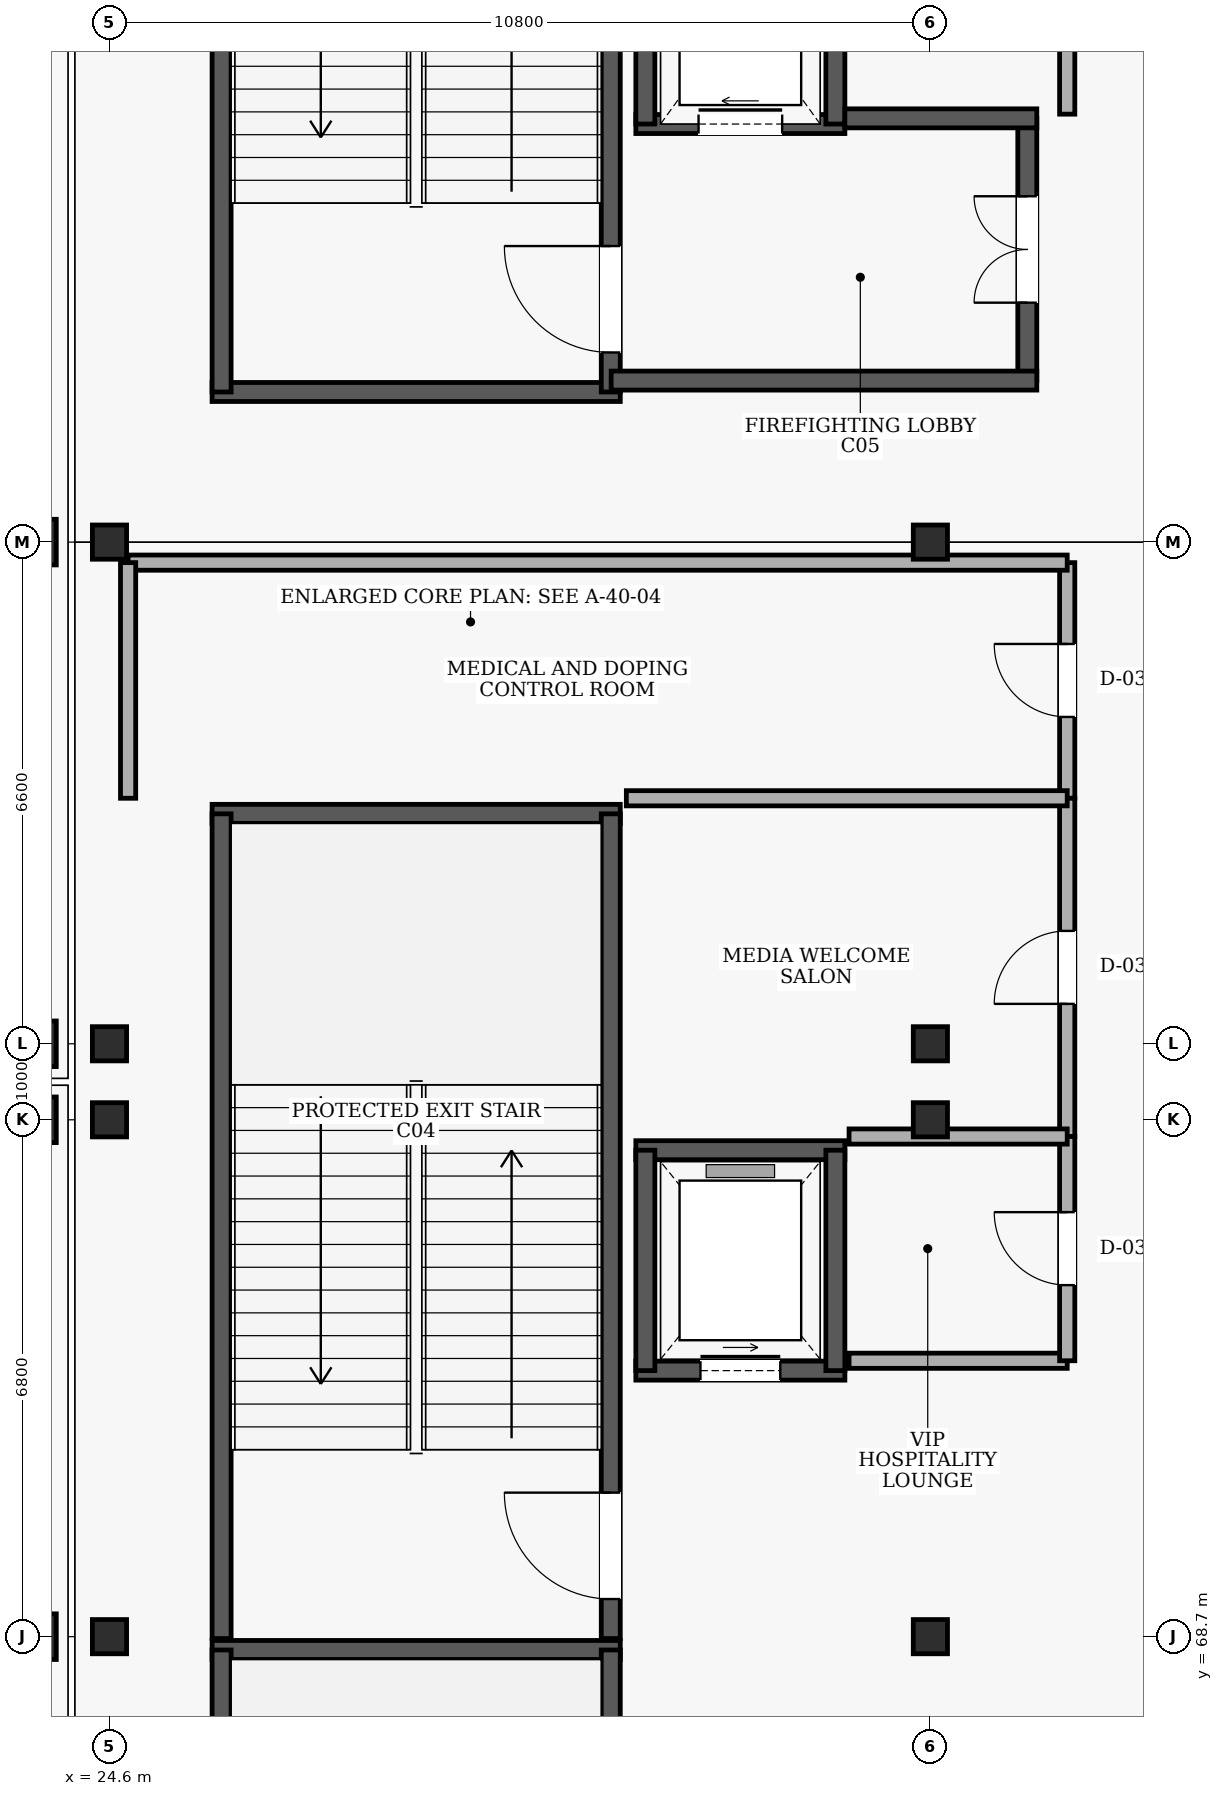
"""IFC4 building model, lengths in metres.
Left out: names, types, materials, properties, quantities, classifications, styles, units other than length and angle.
Written with IfcOpenShell. Run it as: python <this file> out.ifc"""

import sys

from ifc_helpers import new_model, si_unit, direction, frame, frame_2d, origin, origin_2d, place, context, subcontext, project, spatial, rectangle, extrude, element, fill, save


model = new_model("IFC4")
c1 = context("Model", 3, precision=1e-05, world=origin(), true_north=direction((0.0, 1.0)))
c2 = subcontext(c1, "Body", "Model", "MODEL_VIEW")
j1 = project(units=[si_unit("LENGTHUNIT", "METRE"), si_unit("PLANEANGLEUNIT", "RADIAN")], contexts=[c1])
p1 = place(None, origin())
s1 = spatial("IfcSite", under=j1, at=p1, CompositionType="ELEMENT")
p2 = place(p1, origin())
s2 = spatial("IfcBuilding", under=s1, at=p2, CompositionType="ELEMENT")
p3 = place(p2, origin())
s3 = spatial("IfcBuildingStorey", under=s2, at=p3, CompositionType="ELEMENT", Elevation=0.0)
for number, where, z_axis, x_axis in (
    (1, (23.6, 68.7, 0.0), (0.0, 0.0, 1.0), (1.0, 0.0, 0.0)),
    (2, (23.6, 75.5, 0.0), (0.0, 0.0, 1.0), (1.0, 0.0, 0.0)),
    (3, (23.6, 76.5, 0.0), (0.0, 0.0, 1.0), (1.0, 0.0, 0.0)),
    (4, (23.6, 83.1, 0.0), (0.0, 0.0, 1.0), (1.0, 0.0, 0.0)),
):
    element("IfcColumn", number, at=place(p3, frame(where, z_axis=z_axis, x_axis=x_axis)), inside=s3, PredefinedType="COLUMN", context=c2, shape_type="SweptSolid", body=[
        extrude(rectangle(XDim=0.6, YDim=0.6, at=origin_2d()), origin(), (0.0, 0.0, 1.0), 5.4),
    ])
for number, where, z_axis, x_axis in (
    (5, (24.6, 68.7, 0.0), (0.0, 0.0, 1.0), (1.0, 0.0, 0.0)),
    (6, (24.6, 75.5, 0.0), (0.0, 0.0, 1.0), (1.0, 0.0, 0.0)),
    (7, (24.6, 76.5, 0.0), (0.0, 0.0, 1.0), (1.0, 0.0, 0.0)),
    (8, (24.6, 83.1, 0.0), (0.0, 0.0, 1.0), (1.0, 0.0, 0.0)),
    (9, (35.4, 68.7, 0.0), (0.0, 0.0, 1.0), (1.0, 0.0, 0.0)),
    (10, (35.4, 75.5, 0.0), (0.0, 0.0, 1.0), (1.0, 0.0, 0.0)),
    (11, (35.4, 76.5, 0.0), (0.0, 0.0, 1.0), (1.0, 0.0, 0.0)),
    (12, (35.4, 83.1, 0.0), (0.0, 0.0, 1.0), (1.0, 0.0, 0.0)),
):
    element("IfcColumn", number, at=place(p3, frame(where, z_axis=z_axis, x_axis=x_axis)), inside=s3, PredefinedType="COLUMN", context=c2, shape_type="SweptSolid", body=[
        extrude(rectangle(XDim=0.45, YDim=0.45, at=origin_2d()), origin(), (0.0, 0.0, 1.0), 5.4),
    ])
p4 = place(p3, frame((31.32, 68.525, 0.0), z_axis=(0.0, 0.0, 1.0), x_axis=(-1.0, 0.0, 0.0)))
e13 = element("IfcWall", 13, at=p4, inside=s3, PredefinedType="SHEAR", context=c2, shape_type="SweptSolid", body=[
    extrude(rectangle(XDim=5.37, YDim=0.25, at=frame_2d((2.685, 0.0))), origin(), (0.0, 0.0, 1.0), 5.08),
])
p5 = place(p3, frame((26.075, 57.675, 0.0), z_axis=(0.0, 0.0, 1.0), x_axis=(0.0, 1.0, 0.0)))
e14 = element("IfcWall", 14, at=p5, inside=s3, PredefinedType="SHEAR", context=c2, shape_type="SweptSolid", body=[
    extrude(rectangle(XDim=10.85, YDim=0.25, at=frame_2d((5.425, 0.0))), origin(), (0.0, 0.0, 1.0), 5.08),
])
p6 = place(p3, frame((31.195, 57.675, 0.0), z_axis=(0.0, 0.0, 1.0), x_axis=(0.0, 1.0, 0.0)))
e15 = element("IfcWall", 15, at=p6, inside=s3, PredefinedType="SHEAR", context=c2, shape_type="SweptSolid", body=[
    extrude(rectangle(XDim=10.85, YDim=0.25, at=frame_2d((5.425, 0.0))), origin(), (0.0, 0.0, 1.0), 5.08),
])
p7 = place(p6, frame((0.52, 0.0, 0.0)))
e16 = element("IfcOpeningElement", 16, at=p7, cuts=e15, PredefinedType="OPENING", context=c2, shape_type="SweptSolid", body=[
    extrude(rectangle(XDim=1.4, YDim=2.15, at=frame_2d((0.7, 1.075))), frame((0.0, 0.135, 0.0), z_axis=(0.0, -1.0, 0.0), x_axis=(1.0, 0.0, 0.0)), (0.0, 0.0, 1.0), 0.27),
])
p8 = place(p3, frame((31.32, 79.525, 0.0), z_axis=(0.0, 0.0, 1.0), x_axis=(-1.0, 0.0, 0.0)))
e17 = element("IfcWall", 17, at=p8, inside=s3, PredefinedType="SHEAR", context=c2, shape_type="SweptSolid", body=[
    extrude(rectangle(XDim=5.37, YDim=0.25, at=frame_2d((2.685, 0.0))), origin(), (0.0, 0.0, 1.0), 5.08),
])
p9 = place(p3, frame((26.075, 68.675, 0.0), z_axis=(0.0, 0.0, 1.0), x_axis=(0.0, 1.0, 0.0)))
e18 = element("IfcWall", 18, at=p9, inside=s3, PredefinedType="SHEAR", context=c2, shape_type="SweptSolid", body=[
    extrude(rectangle(XDim=10.85, YDim=0.25, at=frame_2d((5.425, 0.0))), origin(), (0.0, 0.0, 1.0), 5.08),
])
p10 = place(p3, frame((31.195, 68.675, 0.0), z_axis=(0.0, 0.0, 1.0), x_axis=(0.0, 1.0, 0.0)))
e19 = element("IfcWall", 19, at=p10, inside=s3, PredefinedType="SHEAR", context=c2, shape_type="SweptSolid", body=[
    extrude(rectangle(XDim=10.85, YDim=0.25, at=frame_2d((5.425, 0.0))), origin(), (0.0, 0.0, 1.0), 5.08),
])
p11 = place(p10, frame((0.52, 0.0, 0.0)))
e20 = element("IfcOpeningElement", 20, at=p11, cuts=e19, PredefinedType="OPENING", context=c2, shape_type="SweptSolid", body=[
    extrude(rectangle(XDim=1.4, YDim=2.15, at=frame_2d((0.7, 1.075))), frame((0.0, 0.135, 0.0), z_axis=(0.0, -1.0, 0.0), x_axis=(1.0, 0.0, 0.0)), (0.0, 0.0, 1.0), 0.27),
])
p12 = place(p3, frame((25.95, 85.075, 0.0), z_axis=(0.0, 0.0, 1.0), x_axis=(1.0, 0.0, 0.0)))
e21 = element("IfcWall", 21, at=p12, inside=s3, PredefinedType="SHEAR", context=c2, shape_type="SweptSolid", body=[
    extrude(rectangle(XDim=5.37, YDim=0.25, at=frame_2d((2.685, 0.0))), origin(), (0.0, 0.0, 1.0), 5.08),
])
p13 = place(p3, frame((26.075, 85.075, 0.0), z_axis=(0.0, 0.0, 1.0), x_axis=(0.0, 1.0, 0.0)))
e22 = element("IfcWall", 22, at=p13, inside=s3, PredefinedType="SHEAR", context=c2, shape_type="SweptSolid", body=[
    extrude(rectangle(XDim=10.85, YDim=0.25, at=frame_2d((5.425, 0.0))), origin(), (0.0, 0.0, 1.0), 5.08),
])
p14 = place(p3, frame((31.195, 85.075, 0.0), z_axis=(0.0, 0.0, 1.0), x_axis=(0.0, 1.0, 0.0)))
e23 = element("IfcWall", 23, at=p14, inside=s3, PredefinedType="SHEAR", context=c2, shape_type="SweptSolid", body=[
    extrude(rectangle(XDim=10.85, YDim=0.25, at=frame_2d((5.425, 0.0))), origin(), (0.0, 0.0, 1.0), 5.08),
])
p15 = place(p14, frame((0.52, 0.0, 0.0)))
e24 = element("IfcOpeningElement", 24, at=p15, cuts=e23, PredefinedType="OPENING", context=c2, shape_type="SweptSolid", body=[
    extrude(rectangle(XDim=1.4, YDim=2.15, at=frame_2d((0.7, 1.075))), frame((0.0, 0.135, 0.0), z_axis=(0.0, -1.0, 0.0), x_axis=(1.0, 0.0, 0.0)), (0.0, 0.0, 1.0), 0.27),
])
p16 = place(p3, frame((31.525, 72.2, 0.0), z_axis=(0.0, 0.0, 1.0), x_axis=(1.0, 0.0, 0.0)))
e25 = element("IfcWall", 25, at=p16, inside=s3, PredefinedType="SHEAR", context=c2, shape_type="SweptSolid", body=[
    extrude(rectangle(XDim=2.75, YDim=0.25, at=frame_2d((1.375, 0.0))), origin(), (0.0, 0.0, 1.0), 5.08),
])
p17 = place(p16, frame((0.85, 0.0, 0.0)))
e26 = element("IfcOpeningElement", 26, at=p17, cuts=e25, PredefinedType="OPENING", context=c2, shape_type="SweptSolid", body=[
    extrude(rectangle(XDim=1.05, YDim=2.15, at=frame_2d((0.525, 1.075))), frame((0.0, 0.135, 0.0), z_axis=(0.0, -1.0, 0.0), x_axis=(1.0, 0.0, 0.0)), (0.0, 0.0, 1.0), 0.27),
])
p18 = place(p3, frame((34.275, 75.1, 0.0), z_axis=(0.0, 0.0, 1.0), x_axis=(-1.0, 0.0, 0.0)))
e27 = element("IfcWall", 27, at=p18, inside=s3, PredefinedType="SHEAR", context=c2, shape_type="SweptSolid", body=[
    extrude(rectangle(XDim=2.75, YDim=0.25, at=frame_2d((1.375, 0.0))), origin(), (0.0, 0.0, 1.0), 5.08),
])
for number, where, z_axis, x_axis in (
    (28, (31.65, 75.1, 0.0), (0.0, 0.0, 1.0), (0.0, -1.0, 0.0)),
    (29, (34.15, 72.2, 0.0), (0.0, 0.0, 1.0), (0.0, 1.0, 0.0)),
):
    element("IfcWall", number, at=place(p3, frame(where, z_axis=z_axis, x_axis=x_axis)), inside=s3, PredefinedType="SHEAR", context=c2, shape_type="SweptSolid", body=[
        extrude(rectangle(XDim=2.9, YDim=0.25, at=frame_2d((1.45, 0.0))), origin(), (0.0, 0.0, 1.0), 5.08),
    ])
p19 = place(p3, frame((31.525, 88.6, 0.0), z_axis=(0.0, 0.0, 1.0), x_axis=(1.0, 0.0, 0.0)))
e30 = element("IfcWall", 30, at=p19, inside=s3, PredefinedType="SHEAR", context=c2, shape_type="SweptSolid", body=[
    extrude(rectangle(XDim=2.75, YDim=0.25, at=frame_2d((1.375, 0.0))), origin(), (0.0, 0.0, 1.0), 5.08),
])
p20 = place(p19, frame((0.825, 0.0, 0.0)))
e31 = element("IfcOpeningElement", 31, at=p20, cuts=e30, PredefinedType="OPENING", context=c2, shape_type="SweptSolid", body=[
    extrude(rectangle(XDim=1.1, YDim=2.15, at=frame_2d((0.55, 1.075))), frame((0.0, 0.135, 0.0), z_axis=(0.0, -1.0, 0.0), x_axis=(1.0, 0.0, 0.0)), (0.0, 0.0, 1.0), 0.27),
])
for number, where, z_axis, x_axis in (
    (32, (31.65, 91.5, 0.0), (0.0, 0.0, 1.0), (0.0, -1.0, 0.0)),
    (33, (34.15, 88.6, 0.0), (0.0, 0.0, 1.0), (0.0, 1.0, 0.0)),
):
    element("IfcWall", number, at=place(p3, frame(where, z_axis=z_axis, x_axis=x_axis)), inside=s3, PredefinedType="SHEAR", context=c2, shape_type="SweptSolid", body=[
        extrude(rectangle(XDim=2.9, YDim=0.25, at=frame_2d((1.45, 0.0))), origin(), (0.0, 0.0, 1.0), 5.08),
    ])
p21 = place(p3, frame((36.675, 85.225, 0.0), z_axis=(0.0, 0.0, 1.0), x_axis=(0.0, 1.0, 0.0)))
e34 = element("IfcWall", 34, at=p21, inside=s3, PredefinedType="SHEAR", context=c2, shape_type="SweptSolid", body=[
    extrude(rectangle(XDim=3.45, YDim=0.25, at=frame_2d((1.725, 0.0))), origin(), (0.0, 0.0, 1.0), 5.08),
])
p22 = place(p21, frame((1.025, 0.0, 0.0)))
e35 = element("IfcOpeningElement", 35, at=p22, cuts=e34, PredefinedType="OPENING", context=c2, shape_type="SweptSolid", body=[
    extrude(rectangle(XDim=1.4, YDim=2.15, at=frame_2d((0.7, 1.075))), frame((0.0, 0.135, 0.0), z_axis=(0.0, -1.0, 0.0), x_axis=(1.0, 0.0, 0.0)), (0.0, 0.0, 1.0), 0.27),
])
p23 = place(p3, frame((34.275, 88.675, 0.0), z_axis=(0.0, 0.0, 1.0), x_axis=(1.0, 0.0, 0.0)))
e36 = element("IfcWall", 36, at=p23, inside=s3, PredefinedType="SHEAR", context=c2, shape_type="SweptSolid", body=[
    extrude(rectangle(XDim=2.525, YDim=0.25, at=frame_2d((1.263, 0.0))), origin(), (0.0, 0.0, 1.0), 5.08),
])
p24 = place(p3, frame((31.2, 85.225, 0.0), z_axis=(0.0, 0.0, 1.0), x_axis=(1.0, 0.0, 0.0)))
e37 = element("IfcWall", 37, at=p24, inside=s3, PredefinedType="SHEAR", context=c2, shape_type="SweptSolid", body=[
    extrude(rectangle(XDim=5.6, YDim=0.25, at=frame_2d((2.8, 0.0))), origin(), (0.0, 0.0, 1.0), 5.08),
])
p25 = place(p3, frame((37.2, 79.73, 0.0), z_axis=(0.0, 0.0, 1.0), x_axis=(0.0, 1.0, 0.0)))
e38 = element("IfcWall", 38, at=p25, inside=s3, PredefinedType="PARTITIONING", context=c2, shape_type="SweptSolid", body=[
    extrude(rectangle(XDim=3.1, YDim=0.2, at=frame_2d((1.55, 0.0))), origin(), (0.0, 0.0, 1.0), 5.08),
])
p26 = place(p25, frame((1.07, 0.0, 0.0)))
e39 = element("IfcOpeningElement", 39, at=p26, cuts=e38, PredefinedType="OPENING", context=c2, shape_type="SweptSolid", body=[
    extrude(rectangle(XDim=0.96, YDim=2.1, at=frame_2d((0.48, 1.05))), frame((0.0, 0.11, 0.0), z_axis=(0.0, -1.0, 0.0), x_axis=(1.0, 0.0, 0.0)), (0.0, 0.0, 1.0), 0.22),
])
p27 = place(p3, frame((37.2, 82.83, 0.0), z_axis=(0.0, 0.0, 1.0), x_axis=(-1.0, 0.0, 0.0)))
e40 = element("IfcWall", 40, at=p27, inside=s3, PredefinedType="PARTITIONING", context=c2, shape_type="SweptSolid", body=[
    extrude(rectangle(XDim=12.355, YDim=0.2, at=frame_2d((6.177, 0.0))), origin(), (0.0, 0.0, 1.0), 4.26),
])
p28 = place(p3, frame((24.845, 82.83, 0.0), z_axis=(0.0, 0.0, 1.0), x_axis=(0.0, -1.0, 0.0)))
e41 = element("IfcWall", 41, at=p28, inside=s3, PredefinedType="PARTITIONING", context=c2, shape_type="SweptSolid", body=[
    extrude(rectangle(XDim=3.1, YDim=0.2, at=frame_2d((1.55, 0.0))), origin(), (0.0, 0.0, 1.0), 4.56),
])
p29 = place(p3, frame((37.2, 75.28, 0.0), z_axis=(0.0, 0.0, 1.0), x_axis=(0.0, 1.0, 0.0)))
e42 = element("IfcWall", 42, at=p29, inside=s3, PredefinedType="PARTITIONING", context=c2, shape_type="SweptSolid", body=[
    extrude(rectangle(XDim=4.45, YDim=0.2, at=frame_2d((2.225, 0.0))), origin(), (0.0, 0.0, 1.0), 5.08),
])
p30 = place(p29, frame((1.745, 0.0, 0.0)))
e43 = element("IfcOpeningElement", 43, at=p30, cuts=e42, PredefinedType="OPENING", context=c2, shape_type="SweptSolid", body=[
    extrude(rectangle(XDim=0.96, YDim=2.1, at=frame_2d((0.48, 1.05))), frame((0.0, 0.11, 0.0), z_axis=(0.0, -1.0, 0.0), x_axis=(1.0, 0.0, 0.0)), (0.0, 0.0, 1.0), 0.22),
])
p31 = place(p3, frame((37.2, 79.73, 0.0), z_axis=(0.0, 0.0, 1.0), x_axis=(-1.0, 0.0, 0.0)))
e44 = element("IfcWall", 44, at=p31, inside=s3, PredefinedType="PARTITIONING", context=c2, shape_type="SweptSolid", body=[
    extrude(rectangle(XDim=5.8, YDim=0.2, at=frame_2d((2.9, 0.0))), origin(), (0.0, 0.0, 1.0), 5.08),
])
p32 = place(p3, frame((34.33, 72.33, 0.0), z_axis=(0.0, 0.0, 1.0), x_axis=(1.0, 0.0, 0.0)))
e45 = element("IfcWall", 45, at=p32, inside=s3, PredefinedType="PARTITIONING", context=c2, shape_type="SweptSolid", body=[
    extrude(rectangle(XDim=2.87, YDim=0.2, at=frame_2d((1.435, 0.0))), origin(), (0.0, 0.0, 1.0), 5.08),
])
p33 = place(p3, frame((37.2, 72.33, 0.0), z_axis=(0.0, 0.0, 1.0), x_axis=(0.0, 1.0, 0.0)))
e46 = element("IfcWall", 46, at=p33, inside=s3, PredefinedType="PARTITIONING", context=c2, shape_type="SweptSolid", body=[
    extrude(rectangle(XDim=2.95, YDim=0.2, at=frame_2d((1.475, 0.0))), origin(), (0.0, 0.0, 1.0), 5.08),
])
p34 = place(p33, frame((0.995, 0.0, 0.0)))
e47 = element("IfcOpeningElement", 47, at=p34, cuts=e46, PredefinedType="OPENING", context=c2, shape_type="SweptSolid", body=[
    extrude(rectangle(XDim=0.96, YDim=2.1, at=frame_2d((0.48, 1.05))), frame((0.0, 0.11, 0.0), z_axis=(0.0, -1.0, 0.0), x_axis=(1.0, 0.0, 0.0)), (0.0, 0.0, 1.0), 0.22),
])
p35 = place(p3, frame((37.2, 75.28, 0.0), z_axis=(0.0, 0.0, 1.0), x_axis=(-1.0, 0.0, 0.0)))
e48 = element("IfcWall", 48, at=p35, inside=s3, PredefinedType="PARTITIONING", context=c2, shape_type="SweptSolid", body=[
    extrude(rectangle(XDim=2.87, YDim=0.2, at=frame_2d((1.435, 0.0))), origin(), (0.0, 0.0, 1.0), 5.08),
])
p36 = place(p3, frame((37.2, 88.73, 0.0), z_axis=(0.0, 0.0, 1.0), x_axis=(0.0, 1.0, 0.0)))
e49 = element("IfcWall", 49, at=p36, inside=s3, PredefinedType="PARTITIONING", context=c2, shape_type="SweptSolid", body=[
    extrude(rectangle(XDim=2.95, YDim=0.2, at=frame_2d((1.475, 0.0))), origin(), (0.0, 0.0, 1.0), 5.08),
])
p37 = place(p36, frame((0.975, 0.0, 0.0)))
e50 = element("IfcOpeningElement", 50, at=p37, cuts=e49, PredefinedType="OPENING", context=c2, shape_type="SweptSolid", body=[
    extrude(rectangle(XDim=1.0, YDim=2.1, at=frame_2d((0.5, 1.05))), frame((0.0, 0.11, 0.0), z_axis=(0.0, -1.0, 0.0), x_axis=(1.0, 0.0, 0.0)), (0.0, 0.0, 1.0), 0.22),
])
p38 = place(p11, frame((1.4, 0.0, 0.0), z_axis=(0.0, 0.0, 1.0), x_axis=(-1.0, 0.0, 0.0)))
e51 = element("IfcDoor", 51, at=p38, inside=s3, OperationType="SINGLE_SWING_LEFT", PredefinedType="DOOR", context=c2, shape_type="SweptSolid", body=[
    extrude(rectangle(XDim=1.4, YDim=2.15, at=frame_2d((0.7, 1.075))), frame((0.0, 0.025, 0.0), z_axis=(0.0, -1.0, 0.0), x_axis=(1.0, 0.0, 0.0)), (0.0, 0.0, 1.0), 0.05),
])
fill(e20, e51)
p39 = place(p15, frame((1.4, 0.0, 0.0), z_axis=(0.0, 0.0, 1.0), x_axis=(-1.0, 0.0, 0.0)))
e52 = element("IfcDoor", 52, at=p39, inside=s3, OperationType="SINGLE_SWING_LEFT", PredefinedType="DOOR", context=c2, shape_type="SweptSolid", body=[
    extrude(rectangle(XDim=1.4, YDim=2.15, at=frame_2d((0.7, 1.075))), frame((0.0, 0.025, 0.0), z_axis=(0.0, -1.0, 0.0), x_axis=(1.0, 0.0, 0.0)), (0.0, 0.0, 1.0), 0.05),
])
fill(e24, e52)
p40 = place(p17, origin())
e53 = element("IfcDoor", 53, at=p40, inside=s3, OperationType="SLIDING_TO_LEFT", PredefinedType="DOOR", context=c2, shape_type="SweptSolid", body=[
    extrude(rectangle(XDim=1.05, YDim=2.15, at=frame_2d((0.525, 1.075))), frame((0.0, 0.025, 0.0), z_axis=(0.0, -1.0, 0.0), x_axis=(1.0, 0.0, 0.0)), (0.0, 0.0, 1.0), 0.05),
])
fill(e26, e53)
p41 = place(p20, origin())
e54 = element("IfcDoor", 54, at=p41, inside=s3, OperationType="SLIDING_TO_RIGHT", PredefinedType="DOOR", context=c2, shape_type="SweptSolid", body=[
    extrude(rectangle(XDim=1.1, YDim=2.15, at=frame_2d((0.55, 1.075))), frame((0.0, 0.025, 0.0), z_axis=(0.0, -1.0, 0.0), x_axis=(1.0, 0.0, 0.0)), (0.0, 0.0, 1.0), 0.05),
])
fill(e31, e54)
p42 = place(p22, origin())
e55 = element("IfcDoor", 55, at=p42, inside=s3, OperationType="DOUBLE_DOOR_SINGLE_SWING", PredefinedType="DOOR", context=c2, shape_type="SweptSolid", body=[
    extrude(rectangle(XDim=1.4, YDim=2.15, at=frame_2d((0.7, 1.075))), frame((0.0, 0.025, 0.0), z_axis=(0.0, -1.0, 0.0), x_axis=(1.0, 0.0, 0.0)), (0.0, 0.0, 1.0), 0.05),
])
fill(e35, e55)
p43 = place(p26, origin())
e56 = element("IfcDoor", 56, at=p43, inside=s3, OperationType="SINGLE_SWING_RIGHT", PredefinedType="DOOR", context=c2, shape_type="SweptSolid", body=[
    extrude(rectangle(XDim=0.96, YDim=2.1, at=frame_2d((0.48, 1.05))), frame((0.0, 0.025, 0.0), z_axis=(0.0, -1.0, 0.0), x_axis=(1.0, 0.0, 0.0)), (0.0, 0.0, 1.0), 0.05),
])
fill(e39, e56)
p44 = place(p30, origin())
e57 = element("IfcDoor", 57, at=p44, inside=s3, OperationType="SINGLE_SWING_LEFT", PredefinedType="DOOR", context=c2, shape_type="SweptSolid", body=[
    extrude(rectangle(XDim=0.96, YDim=2.1, at=frame_2d((0.48, 1.05))), frame((0.0, 0.025, 0.0), z_axis=(0.0, -1.0, 0.0), x_axis=(1.0, 0.0, 0.0)), (0.0, 0.0, 1.0), 0.05),
])
fill(e43, e57)
p45 = place(p34, origin())
e58 = element("IfcDoor", 58, at=p45, inside=s3, OperationType="SINGLE_SWING_RIGHT", PredefinedType="DOOR", context=c2, shape_type="SweptSolid", body=[
    extrude(rectangle(XDim=0.96, YDim=2.1, at=frame_2d((0.48, 1.05))), frame((0.0, 0.025, 0.0), z_axis=(0.0, -1.0, 0.0), x_axis=(1.0, 0.0, 0.0)), (0.0, 0.0, 1.0), 0.05),
])
fill(e47, e58)
save(model, sys.argv[1])
